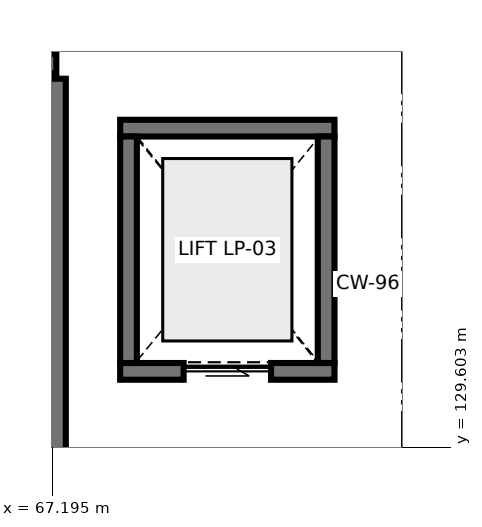
"""IFC4 building model, lengths in metres.
Left out: names, types, materials, properties, quantities, classifications, styles, units other than length and angle.
Written with IfcOpenShell. Run it as: python <this file> out.ifc"""

import sys

from ifc_helpers import new_model, si_unit, direction, frame, frame_2d, origin, place, context, subcontext, project, spatial, rectangle, extrude, element, fill, save


model = new_model("IFC4")
c1 = context("Model", 3, precision=1e-05, world=origin(), true_north=direction((0.0, 1.0)))
c2 = subcontext(c1, "Body", "Model", "MODEL_VIEW")
j1 = project(units=[si_unit("LENGTHUNIT", "METRE"), si_unit("PLANEANGLEUNIT", "RADIAN")], contexts=[c1])
p1 = place(None, origin())
s1 = spatial("IfcSite", under=j1, at=p1, CompositionType="ELEMENT")
p2 = place(p1, origin())
s2 = spatial("IfcBuilding", under=s1, at=p2, CompositionType="ELEMENT")
p3 = place(p2, frame((0.0, 0.0, 5.4)))
s3 = spatial("IfcBuildingStorey", under=s2, at=p3, CompositionType="ELEMENT", Elevation=5.4)
p4 = place(p3, frame((58.95, 134.65, 0.0), z_axis=(0.0, 0.0, 1.0), x_axis=(1.0, 0.0, 0.0)))
e1 = element("IfcWall", 1, at=p4, inside=s3, PredefinedType="SHEAR", context=c2, shape_type="SweptSolid", body=[
    extrude(rectangle(XDim=8.3, YDim=0.25, at=frame_2d((4.15, 0.0))), origin(), (0.0, 0.0, 1.0), 4.53),
])
p5 = place(p3, frame((67.25, 134.45, 0.0), z_axis=(0.0, 0.0, 1.0), x_axis=(0.0, -1.0, 0.0)))
e2 = element("IfcWall", 2, at=p5, inside=s3, PredefinedType="SHEAR", context=c2, shape_type="SweptSolid", body=[
    extrude(rectangle(XDim=5.3, YDim=0.25, at=frame_2d((2.65, 0.0))), origin(), (0.0, 0.0, 1.0), 4.53),
])
p6 = place(p3, frame((68.09, 130.6, 0.0), z_axis=(0.0, 0.0, 1.0), x_axis=(1.0, 0.0, 0.0)))
e3 = element("IfcWall", 3, at=p6, inside=s3, PredefinedType="SHEAR", context=c2, shape_type="SweptSolid", body=[
    extrude(rectangle(XDim=2.82, YDim=0.22, at=frame_2d((1.41, 0.0))), origin(), (0.0, 0.0, 1.0), 4.53),
])
p7 = place(p6, frame((0.835, 0.0, 0.0)))
e4 = element("IfcOpeningElement", 4, at=p7, cuts=e3, PredefinedType="OPENING", context=c2, shape_type="SweptSolid", body=[
    extrude(rectangle(XDim=1.15, YDim=2.2, at=frame_2d((0.575, 1.1))), frame((0.0, 0.12, 0.0), z_axis=(0.0, -1.0, 0.0), x_axis=(1.0, 0.0, 0.0)), (0.0, 0.0, 1.0), 0.24),
])
p8 = place(p3, frame((68.09, 133.8, 0.0), z_axis=(0.0, 0.0, 1.0), x_axis=(1.0, 0.0, 0.0)))
e5 = element("IfcWall", 5, at=p8, inside=s3, PredefinedType="SHEAR", context=c2, shape_type="SweptSolid", body=[
    extrude(rectangle(XDim=2.82, YDim=0.22, at=frame_2d((1.41, 0.0))), origin(), (0.0, 0.0, 1.0), 4.53),
])
for number, where, z_axis, x_axis in (
    (6, (68.2, 130.71, 0.0), (0.0, 0.0, 1.0), (0.0, 1.0, 0.0)),
    (7, (70.8, 130.71, 0.0), (0.0, 0.0, 1.0), (0.0, 1.0, 0.0)),
):
    element("IfcWall", number, at=place(p3, frame(where, z_axis=z_axis, x_axis=x_axis)), inside=s3, PredefinedType="SHEAR", context=c2, shape_type="SweptSolid", body=[
        extrude(rectangle(XDim=2.98, YDim=0.22, at=frame_2d((1.49, 0.0))), origin(), (0.0, 0.0, 1.0), 4.53),
    ])
p9 = place(p7, origin())
e8 = element("IfcDoor", 8, at=p9, inside=s3, OperationType="SLIDING_TO_LEFT", PredefinedType="DOOR", context=c2, shape_type="SweptSolid", body=[
    extrude(rectangle(XDim=1.15, YDim=2.2, at=frame_2d((0.575, 1.1))), frame((0.0, 0.025, 0.0), z_axis=(0.0, -1.0, 0.0), x_axis=(1.0, 0.0, 0.0)), (0.0, 0.0, 1.0), 0.05),
])
fill(e4, e8)
save(model, sys.argv[1])
